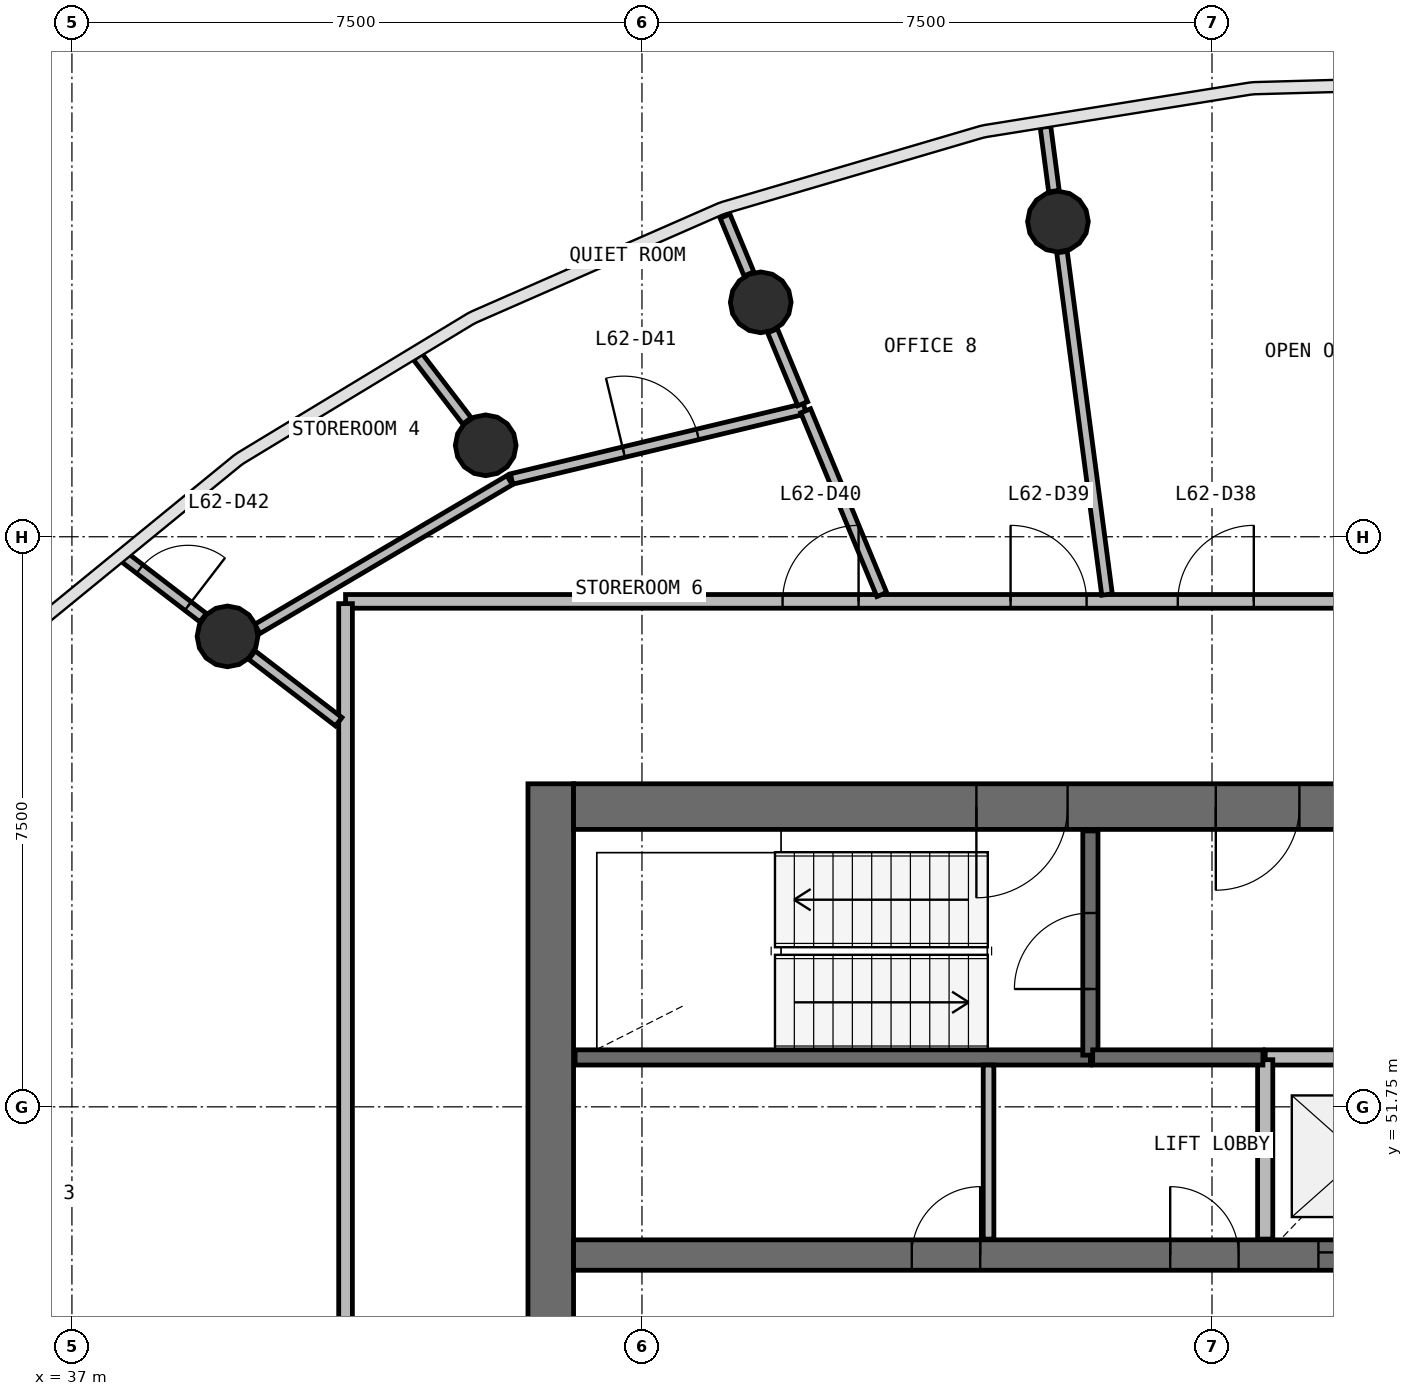
"""IFC4 building model, lengths in metres.
Left out: names, types, materials, properties, quantities, classifications, styles, units other than length and angle.
Written with IfcOpenShell. Run it as: python <this file> out.ifc"""

import sys

from ifc_helpers import new_model, si_unit, direction, frame, frame_2d, origin, origin_2d, place, context, subcontext, project, spatial, rectangle, circle, extrude, source, transform, mapped, element, fill, save


model = new_model("IFC4")
c1 = context("Model", 3, precision=1e-05, world=origin(), true_north=direction((0.0, 1.0)))
c2 = subcontext(c1, "Body", "Model", "MODEL_VIEW")
j1 = project(units=[si_unit("LENGTHUNIT", "METRE"), si_unit("PLANEANGLEUNIT", "RADIAN")], contexts=[c1])
p1 = place(None, origin())
s1 = spatial("IfcSite", under=j1, at=p1, CompositionType="ELEMENT")
p2 = place(p1, origin())
s2 = spatial("IfcBuilding", under=s1, at=p2, CompositionType="ELEMENT")
p3 = place(p2, frame((0.0, 0.0, 254.0)))
s3 = spatial("IfcBuildingStorey", under=s2, at=p3, CompositionType="ELEMENT", Elevation=254.0)
p4 = place(p3, frame((43.3, 56.0, 0.0), z_axis=(0.0, 0.0, 1.0), x_axis=(0.0, -1.0, 0.0)))
e1 = element("IfcWall", 1, at=p4, inside=s3, PredefinedType="SHEAR", context=c2, shape_type="SweptSolid", body=[
    extrude(rectangle(XDim=16.0, YDim=0.6, at=frame_2d((8.0, 0.0))), origin(), (0.0, 0.0, 1.0), 3.9),
])
p5 = place(p4, frame((7.1, 0.0, 0.0)))
e2 = element("IfcOpeningElement", 2, at=p5, cuts=e1, PredefinedType="OPENING", context=c2, shape_type="SweptSolid", body=[
    extrude(rectangle(XDim=1.8, YDim=2.1, at=frame_2d((0.9, 1.05))), frame((0.0, 0.31, 0.0), z_axis=(0.0, -1.0, 0.0), x_axis=(1.0, 0.0, 0.0)), (0.0, 0.0, 1.0), 0.62),
])
p6 = place(p3, frame((60.4, 55.7, 0.0), z_axis=(0.0, 0.0, 1.0), x_axis=(-1.0, 0.0, 0.0)))
e3 = element("IfcWall", 3, at=p6, inside=s3, PredefinedType="SHEAR", context=c2, shape_type="SweptSolid", body=[
    extrude(rectangle(XDim=16.8, YDim=0.6, at=frame_2d((8.4, 0.0))), origin(), (0.0, 0.0, 1.0), 3.9),
])
p7 = place(p6, frame((0.4, 0.0, 0.0)))
e4 = element("IfcOpeningElement", 4, at=p7, cuts=e3, PredefinedType="OPENING", context=c2, shape_type="SweptSolid", body=[
    extrude(rectangle(XDim=1.1, YDim=2.1, at=frame_2d((0.55, 1.05))), frame((0.0, 0.31, 0.0), z_axis=(0.0, -1.0, 0.0), x_axis=(1.0, 0.0, 0.0)), (0.0, 0.0, 1.0), 0.62),
])
p8 = place(p6, frame((10.3, 0.0, 0.0)))
e5 = element("IfcOpeningElement", 5, at=p8, cuts=e3, PredefinedType="OPENING", context=c2, shape_type="SweptSolid", body=[
    extrude(rectangle(XDim=1.2, YDim=2.1, at=frame_2d((0.6, 1.05))), frame((0.0, 0.31, 0.0), z_axis=(0.0, -1.0, 0.0), x_axis=(1.0, 0.0, 0.0)), (0.0, 0.0, 1.0), 0.62),
])
p9 = place(p6, frame((7.25, 0.0, 0.0)))
e6 = element("IfcOpeningElement", 6, at=p9, cuts=e3, PredefinedType="OPENING", context=c2, shape_type="SweptSolid", body=[
    extrude(rectangle(XDim=1.1, YDim=2.1, at=frame_2d((0.55, 1.05))), frame((0.0, 0.31, 0.0), z_axis=(0.0, -1.0, 0.0), x_axis=(1.0, 0.0, 0.0)), (0.0, 0.0, 1.0), 0.62),
])
p10 = place(p3, frame((43.6, 49.8, 0.0), z_axis=(0.0, 0.0, 1.0), x_axis=(1.0, 0.0, 0.0)))
e7 = element("IfcWall", 7, at=p10, inside=s3, PredefinedType="SHEAR", context=c2, shape_type="SweptSolid", body=[
    extrude(rectangle(XDim=16.8, YDim=0.4, at=frame_2d((8.4, 0.0))), origin(), (0.0, 0.0, 1.0), 3.9),
])
p11 = place(p10, frame((9.8, 0.0, 0.0)))
e8 = element("IfcOpeningElement", 8, at=p11, cuts=e7, PredefinedType="OPENING", context=c2, shape_type="SweptSolid", body=[
    extrude(rectangle(XDim=1.1, YDim=2.1, at=frame_2d((0.55, 1.05))), frame((0.0, 0.21, 0.0), z_axis=(0.0, -1.0, 0.0), x_axis=(1.0, 0.0, 0.0)), (0.0, 0.0, 1.0), 0.42),
])
p12 = place(p10, frame((12.3, 0.0, 0.0)))
e9 = element("IfcOpeningElement", 9, at=p12, cuts=e7, PredefinedType="OPENING", context=c2, shape_type="SweptSolid", body=[
    extrude(rectangle(XDim=1.1, YDim=2.1, at=frame_2d((0.55, 1.05))), frame((0.0, 0.21, 0.0), z_axis=(0.0, -1.0, 0.0), x_axis=(1.0, 0.0, 0.0)), (0.0, 0.0, 1.0), 0.42),
])
p13 = place(p10, frame((14.8, 0.0, 0.0)))
e10 = element("IfcOpeningElement", 10, at=p13, cuts=e7, PredefinedType="OPENING", context=c2, shape_type="SweptSolid", body=[
    extrude(rectangle(XDim=1.1, YDim=2.1, at=frame_2d((0.55, 1.05))), frame((0.0, 0.21, 0.0), z_axis=(0.0, -1.0, 0.0), x_axis=(1.0, 0.0, 0.0)), (0.0, 0.0, 1.0), 0.42),
])
p14 = place(p10, frame((4.45, 0.0, 0.0)))
e11 = element("IfcOpeningElement", 11, at=p14, cuts=e7, PredefinedType="OPENING", context=c2, shape_type="SweptSolid", body=[
    extrude(rectangle(XDim=0.9, YDim=2.1, at=frame_2d((0.45, 1.05))), frame((0.0, 0.21, 0.0), z_axis=(0.0, -1.0, 0.0), x_axis=(1.0, 0.0, 0.0)), (0.0, 0.0, 1.0), 0.42),
])
p15 = place(p10, frame((7.85, 0.0, 0.0)))
e12 = element("IfcOpeningElement", 12, at=p15, cuts=e7, PredefinedType="OPENING", context=c2, shape_type="SweptSolid", body=[
    extrude(rectangle(XDim=0.9, YDim=2.1, at=frame_2d((0.45, 1.05))), frame((0.0, 0.21, 0.0), z_axis=(0.0, -1.0, 0.0), x_axis=(1.0, 0.0, 0.0)), (0.0, 0.0, 1.0), 0.42),
])
m1 = source(origin(), c2, "Body", "SweptSolid", [
    extrude(circle(Radius=0.4, at=origin_2d()), origin(), (0.0, 0.0, 1.0), 3.9),
])
for number, where, z_axis, x_axis in (
    (13, (49.973, 63.396, 0.0), (0.0, 0.0, 1.0), (1.0, 0.0, 0.0)),
    (14, (46.063, 62.334, 0.0), (0.0, 0.0, 1.0), (1.0, 0.0, 0.0)),
    (15, (42.444, 60.453, 0.0), (0.0, 0.0, 1.0), (1.0, 0.0, 0.0)),
    (16, (39.047, 57.939, 0.0), (0.0, 0.0, 1.0), (1.0, 0.0, 0.0)),
):
    element("IfcColumn", number, at=place(p3, frame(where, z_axis=z_axis, x_axis=x_axis)), inside=s3, PredefinedType="COLUMN", context=c2, shape_type="MappedRepresentation", body=[
        mapped(m1, transform((0.0, 0.0, 0.0), scale=1.0)),
    ])
p16 = place(p3, frame((43.62, 52.4, 0.0), z_axis=(0.0, 0.0, 1.0), x_axis=(1.0, 0.0, 0.0)))
e17 = element("IfcWall", 17, at=p16, inside=s3, PredefinedType="SOLIDWALL", context=c2, shape_type="SweptSolid", body=[
    extrude(rectangle(XDim=6.78, YDim=0.2, at=frame_2d((3.39, 0.0))), origin(), (0.0, 0.0, 1.0), 3.58),
])
p17 = place(p3, frame((50.4, 52.43, 0.0), z_axis=(0.0, 0.0, 1.0), x_axis=(0.0, 1.0, 0.0)))
e18 = element("IfcWall", 18, at=p17, inside=s3, PredefinedType="SOLIDWALL", context=c2, shape_type="SweptSolid", body=[
    extrude(rectangle(XDim=2.95, YDim=0.2, at=frame_2d((1.475, 0.0))), origin(), (0.0, 0.0, 1.0), 3.58),
])
p18 = place(p17, frame((0.87, 0.0, 0.0)))
e19 = element("IfcOpeningElement", 19, at=p18, cuts=e18, PredefinedType="OPENING", context=c2, shape_type="SweptSolid", body=[
    extrude(rectangle(XDim=1.0, YDim=2.1, at=frame_2d((0.5, 1.05))), frame((0.0, 0.11, 0.0), z_axis=(0.0, -1.0, 0.0), x_axis=(1.0, 0.0, 0.0)), (0.0, 0.0, 1.0), 0.22),
])
p19 = place(p3, frame((55.2, 52.4, 0.0), z_axis=(0.0, 0.0, 1.0), x_axis=(-1.0, 0.0, 0.0)))
e20 = element("IfcWall", 20, at=p19, inside=s3, PredefinedType="SOLIDWALL", context=c2, shape_type="SweptSolid", body=[
    extrude(rectangle(XDim=2.5, YDim=0.2, at=frame_2d((1.25, 0.0))), origin(), (0.0, 0.0, 1.0), 3.58),
])
p20 = place(p3, frame((52.7, 52.37, 0.0), z_axis=(0.0, 0.0, 1.0), x_axis=(0.0, -1.0, 0.0)))
e21 = element("IfcWall", 21, at=p20, inside=s3, PredefinedType="SOLIDWALL", context=c2, shape_type="SweptSolid", body=[
    extrude(rectangle(XDim=2.36, YDim=0.2, at=frame_2d((1.18, 0.0))), origin(), (0.0, 0.0, 1.0), 3.58),
])
p21 = place(p3, frame((50.43, 52.4, 0.0), z_axis=(0.0, 0.0, 1.0), x_axis=(1.0, 0.0, 0.0)))
e22 = element("IfcWall", 22, at=p21, inside=s3, PredefinedType="SOLIDWALL", context=c2, shape_type="SweptSolid", body=[
    extrude(rectangle(XDim=2.24, YDim=0.2, at=frame_2d((1.12, 0.0))), origin(), (0.0, 0.0, 1.0), 3.58),
])
p22 = place(p3, frame((40.6, 58.4, 0.0), z_axis=(0.0, 0.0, 1.0), x_axis=(1.0, 0.0, 0.0)))
e23 = element("IfcWall", 23, at=p22, inside=s3, PredefinedType="PARTITIONING", context=c2, shape_type="SweptSolid", body=[
    extrude(rectangle(XDim=22.8, YDim=0.18, at=frame_2d((11.4, 0.0))), origin(), (0.0, 0.0, 1.0), 2.88),
])
p23 = place(p22, frame((16.15, 0.0, 0.0)))
e24 = element("IfcOpeningElement", 24, at=p23, cuts=e23, PredefinedType="OPENING", context=c2, shape_type="SweptSolid", body=[
    extrude(rectangle(XDim=1.0, YDim=2.1, at=frame_2d((0.5, 1.05))), frame((0.0, 0.1, 0.0), z_axis=(0.0, -1.0, 0.0), x_axis=(1.0, 0.0, 0.0)), (0.0, 0.0, 1.0), 0.2),
])
p24 = place(p22, frame((10.95, 0.0, 0.0)))
e25 = element("IfcOpeningElement", 25, at=p24, cuts=e23, PredefinedType="OPENING", context=c2, shape_type="SweptSolid", body=[
    extrude(rectangle(XDim=1.0, YDim=2.1, at=frame_2d((0.5, 1.05))), frame((0.0, 0.1, 0.0), z_axis=(0.0, -1.0, 0.0), x_axis=(1.0, 0.0, 0.0)), (0.0, 0.0, 1.0), 0.2),
])
p25 = place(p22, frame((8.75, 0.0, 0.0)))
e26 = element("IfcOpeningElement", 26, at=p25, cuts=e23, PredefinedType="OPENING", context=c2, shape_type="SweptSolid", body=[
    extrude(rectangle(XDim=1.0, YDim=2.1, at=frame_2d((0.5, 1.05))), frame((0.0, 0.1, 0.0), z_axis=(0.0, -1.0, 0.0), x_axis=(1.0, 0.0, 0.0)), (0.0, 0.0, 1.0), 0.2),
])
p26 = place(p22, frame((5.75, 0.0, 0.0)))
e27 = element("IfcOpeningElement", 27, at=p26, cuts=e23, PredefinedType="OPENING", context=c2, shape_type="SweptSolid", body=[
    extrude(rectangle(XDim=1.0, YDim=2.1, at=frame_2d((0.5, 1.05))), frame((0.0, 0.1, 0.0), z_axis=(0.0, -1.0, 0.0), x_axis=(1.0, 0.0, 0.0)), (0.0, 0.0, 1.0), 0.2),
])
p27 = place(p3, frame((40.6, 37.63, 0.0), z_axis=(0.0, 0.0, 1.0), x_axis=(0.0, 1.0, 0.0)))
e28 = element("IfcWall", 28, at=p27, inside=s3, PredefinedType="PARTITIONING", context=c2, shape_type="SweptSolid", body=[
    extrude(rectangle(XDim=20.74, YDim=0.18, at=frame_2d((10.37, 0.0))), origin(), (0.0, 0.0, 1.0), 2.88),
])
p28 = place(p27, frame((7.79, 0.0, 0.0)))
e29 = element("IfcOpeningElement", 29, at=p28, cuts=e28, PredefinedType="OPENING", context=c2, shape_type="SweptSolid", body=[
    extrude(rectangle(XDim=0.9, YDim=2.1, at=frame_2d((0.45, 1.05))), frame((0.0, 0.1, 0.0), z_axis=(0.0, -1.0, 0.0), x_axis=(1.0, 0.0, 0.0)), (0.0, 0.0, 1.0), 0.2),
])
p29 = place(p27, frame((4.39, 0.0, 0.0)))
e30 = element("IfcOpeningElement", 30, at=p29, cuts=e28, PredefinedType="OPENING", context=c2, shape_type="SweptSolid", body=[
    extrude(rectangle(XDim=0.9, YDim=2.1, at=frame_2d((0.45, 1.05))), frame((0.0, 0.1, 0.0), z_axis=(0.0, -1.0, 0.0), x_axis=(1.0, 0.0, 0.0)), (0.0, 0.0, 1.0), 0.2),
])
p30 = place(p27, frame((9.89, 0.0, 0.0)))
e31 = element("IfcOpeningElement", 31, at=p30, cuts=e28, PredefinedType="OPENING", context=c2, shape_type="SweptSolid", body=[
    extrude(rectangle(XDim=1.0, YDim=2.1, at=frame_2d((0.5, 1.05))), frame((0.0, 0.1, 0.0), z_axis=(0.0, -1.0, 0.0), x_axis=(1.0, 0.0, 0.0)), (0.0, 0.0, 1.0), 0.2),
])
p31 = place(p3, frame((50.619, 58.49, 0.0), z_axis=(0.0, 0.0, 1.0), x_axis=(-0.130505936446, 0.991447527887, 0.0)))
e32 = element("IfcWall", 32, at=p31, inside=s3, PredefinedType="PARTITIONING", context=c2, shape_type="SweptSolid", body=[
    extrude(rectangle(XDim=4.544, YDim=0.14, at=frame_2d((2.272, 0.0))), origin(), (0.0, 0.0, 1.0), 2.88),
])
p32 = place(p3, frame((42.785, 60.01, 0.0), z_axis=(0.0, 0.0, 1.0), x_axis=(0.972446486368, 0.233126212921, 0.0)))
e33 = element("IfcWall", 33, at=p32, inside=s3, PredefinedType="PARTITIONING", context=c2, shape_type="SweptSolid", body=[
    extrude(rectangle(XDim=3.967, YDim=0.14, at=frame_2d((1.983, 0.0))), origin(), (0.0, 0.0, 1.0), 2.88),
])
p33 = place(p32, frame((1.517, 0.0, 0.0)))
e34 = element("IfcOpeningElement", 34, at=p33, cuts=e33, PredefinedType="OPENING", context=c2, shape_type="SweptSolid", body=[
    extrude(rectangle(XDim=1.0, YDim=2.1, at=frame_2d((0.5, 1.05))), frame((0.0, 0.08, 0.0), z_axis=(0.0, -1.0, 0.0), x_axis=(1.0, 0.0, 0.0)), (0.0, 0.0, 1.0), 0.16),
])
p34 = place(p3, frame((42.759, 59.994, 0.0), z_axis=(0.0, 0.0, 1.0), x_axis=(-0.861469667811, -0.507809030485, 0.0)))
e35 = element("IfcWall", 35, at=p34, inside=s3, PredefinedType="PARTITIONING", context=c2, shape_type="SweptSolid", body=[
    extrude(rectangle(XDim=3.853, YDim=0.14, at=frame_2d((1.927, 0.0))), origin(), (0.0, 0.0, 1.0), 2.88),
])
p35 = place(p3, frame((47.655, 58.49, 0.0), z_axis=(0.0, 0.0, 1.0), x_axis=(-0.382659528892, 0.923889433292, 0.0)))
e36 = element("IfcWall", 36, at=p35, inside=s3, PredefinedType="PARTITIONING", context=c2, shape_type="SweptSolid", body=[
    extrude(rectangle(XDim=2.616, YDim=0.14, at=frame_2d((1.308, 0.0))), origin(), (0.0, 0.0, 1.0), 2.88),
])
p36 = place(p3, frame((49.06, 50.01, 0.0), z_axis=(0.0, 0.0, 1.0), x_axis=(0.0, 1.0, 0.0)))
e37 = element("IfcWall", 37, at=p36, inside=s3, PredefinedType="PARTITIONING", context=c2, shape_type="SweptSolid", body=[
    extrude(rectangle(XDim=2.29, YDim=0.14, at=frame_2d((1.145, 0.0))), origin(), (0.0, 0.0, 1.0), 2.88),
])
p37 = place(p3, frame((40.51, 56.817, 0.0), z_axis=(0.0, 0.0, 1.0), x_axis=(-0.793316945216, 0.608808857059, 0.0)))
e38 = element("IfcWall", 38, at=p37, inside=s3, PredefinedType="PARTITIONING", context=c2, shape_type="SweptSolid", body=[
    extrude(rectangle(XDim=1.44, YDim=0.14, at=frame_2d((0.72, 0.0))), origin(), (0.0, 0.0, 1.0), 2.88),
])
p38 = place(p3, frame((37.69, 58.98, 0.0), z_axis=(0.0, 0.0, 1.0), x_axis=(0.793401708575, -0.608698389048, 0.0)))
e39 = element("IfcWall", 39, at=p38, inside=s3, PredefinedType="PARTITIONING", context=c2, shape_type="SweptSolid", body=[
    extrude(rectangle(XDim=1.306, YDim=0.14, at=frame_2d((0.653, 0.0))), origin(), (0.0, 0.0, 1.0), 2.88),
])
p39 = place(p38, frame((0.256, 0.0, 0.0)))
e40 = element("IfcOpeningElement", 40, at=p39, cuts=e39, PredefinedType="OPENING", context=c2, shape_type="SweptSolid", body=[
    extrude(rectangle(XDim=0.8, YDim=2.1, at=frame_2d((0.4, 1.05))), frame((0.0, 0.08, 0.0), z_axis=(0.0, -1.0, 0.0), x_axis=(1.0, 0.0, 0.0)), (0.0, 0.0, 1.0), 0.16),
])
p40 = place(p3, frame((46.615, 61.0, 0.0), z_axis=(0.0, 0.0, 1.0), x_axis=(-0.38262856197, 0.923902258664, 0.0)))
e41 = element("IfcWall", 41, at=p40, inside=s3, PredefinedType="PARTITIONING", context=c2, shape_type="SweptSolid", body=[
    extrude(rectangle(XDim=1.039, YDim=0.14, at=frame_2d((0.52, 0.0))), origin(), (0.0, 0.0, 1.0), 2.88),
])
p41 = place(p3, frame((42.198, 60.774, 0.0), z_axis=(0.0, 0.0, 1.0), x_axis=(-0.608691318636, 0.793407132951, 0.0)))
e42 = element("IfcWall", 42, at=p41, inside=s3, PredefinedType="PARTITIONING", context=c2, shape_type="SweptSolid", body=[
    extrude(rectangle(XDim=1.065, YDim=0.14, at=frame_2d((0.533, 0.0))), origin(), (0.0, 0.0, 1.0), 2.88),
])
p42 = place(p3, frame((49.92, 63.797, 0.0), z_axis=(0.0, 0.0, 1.0), x_axis=(-0.130720882624, 0.991419210448, 0.0)))
e43 = element("IfcWall", 43, at=p42, inside=s3, PredefinedType="PARTITIONING", context=c2, shape_type="SweptSolid", body=[
    extrude(rectangle(XDim=0.854, YDim=0.14, at=frame_2d((0.427, 0.0))), origin(), (0.0, 0.0, 1.0), 2.88),
])
p43 = place(p3, frame((45.908, 62.708, 0.0), z_axis=(0.0, 0.0, 1.0), x_axis=(-0.382762017913, 0.923846977396, 0.0)))
e44 = element("IfcWall", 44, at=p43, inside=s3, PredefinedType="PARTITIONING", context=c2, shape_type="SweptSolid", body=[
    extrude(rectangle(XDim=0.823, YDim=0.14, at=frame_2d((0.412, 0.0))), origin(), (0.0, 0.0, 1.0), 2.88),
])
m2 = source(origin(), c2, "Body", "SweptSolid", [
    extrude(rectangle(XDim=1.1, YDim=2.1, at=frame_2d((0.55, 1.05))), frame((0.0, 0.025, 0.0), z_axis=(0.0, -1.0, 0.0), x_axis=(1.0, 0.0, 0.0)), (0.0, 0.0, 1.0), 0.05),
])
p44 = place(p11, origin())
e45 = element("IfcDoor", 45, at=p44, inside=s3, OperationType="DOUBLE_DOOR_SLIDING", PredefinedType="USERDEFINED", context=c2, shape_type="MappedRepresentation", body=[
    mapped(m2, transform((0.0, 0.0, 0.0), scale=1.0)),
])
fill(e8, e45)
m3 = source(origin(), c2, "Body", "SweptSolid", [
    extrude(rectangle(XDim=1.2, YDim=2.1, at=frame_2d((0.6, 1.05))), frame((0.0, 0.025, 0.0), z_axis=(0.0, -1.0, 0.0), x_axis=(1.0, 0.0, 0.0)), (0.0, 0.0, 1.0), 0.05),
])
p45 = place(p8, origin())
e46 = element("IfcDoor", 46, at=p45, inside=s3, OperationType="SINGLE_SWING_RIGHT", PredefinedType="DOOR", context=c2, shape_type="MappedRepresentation", body=[
    mapped(m3, transform((0.0, 0.0, 0.0), scale=1.0)),
])
fill(e5, e46)
m4 = source(origin(), c2, "Body", "SweptSolid", [
    extrude(rectangle(XDim=1.0, YDim=2.1, at=frame_2d((0.5, 1.05))), frame((0.0, 0.025, 0.0), z_axis=(0.0, -1.0, 0.0), x_axis=(1.0, 0.0, 0.0)), (0.0, 0.0, 1.0), 0.05),
])
p46 = place(p18, origin())
e47 = element("IfcDoor", 47, at=p46, inside=s3, OperationType="SINGLE_SWING_LEFT", PredefinedType="DOOR", context=c2, shape_type="MappedRepresentation", body=[
    mapped(m4, transform((0.0, 0.0, 0.0), scale=1.0)),
])
fill(e19, e47)
m5 = source(origin(), c2, "Body", "SweptSolid", [
    extrude(rectangle(XDim=1.1, YDim=2.1, at=frame_2d((0.55, 1.05))), frame((0.0, 0.025, 0.0), z_axis=(0.0, -1.0, 0.0), x_axis=(1.0, 0.0, 0.0)), (0.0, 0.0, 1.0), 0.05),
])
p47 = place(p9, origin())
e48 = element("IfcDoor", 48, at=p47, inside=s3, OperationType="SINGLE_SWING_RIGHT", PredefinedType="DOOR", context=c2, shape_type="MappedRepresentation", body=[
    mapped(m5, transform((0.0, 0.0, 0.0), scale=1.0)),
])
fill(e6, e48)
m6 = source(origin(), c2, "Body", "SweptSolid", [
    extrude(rectangle(XDim=1.0, YDim=2.1, at=frame_2d((0.5, 1.05))), frame((0.0, 0.025, 0.0), z_axis=(0.0, -1.0, 0.0), x_axis=(1.0, 0.0, 0.0)), (0.0, 0.0, 1.0), 0.05),
])
p48 = place(p24, origin())
e49 = element("IfcDoor", 49, at=p48, inside=s3, OperationType="SINGLE_SWING_RIGHT", PredefinedType="DOOR", context=c2, shape_type="MappedRepresentation", body=[
    mapped(m6, transform((0.0, 0.0, 0.0), scale=1.0)),
])
fill(e25, e49)
p49 = place(p25, origin())
e50 = element("IfcDoor", 50, at=p49, inside=s3, OperationType="SINGLE_SWING_LEFT", PredefinedType="DOOR", context=c2, shape_type="MappedRepresentation", body=[
    mapped(m6, transform((0.0, 0.0, 0.0), scale=1.0)),
])
fill(e26, e50)
p50 = place(p26, origin())
e51 = element("IfcDoor", 51, at=p50, inside=s3, OperationType="SINGLE_SWING_RIGHT", PredefinedType="DOOR", context=c2, shape_type="MappedRepresentation", body=[
    mapped(m6, transform((0.0, 0.0, 0.0), scale=1.0)),
])
fill(e27, e51)
p51 = place(p33, origin())
e52 = element("IfcDoor", 52, at=p51, inside=s3, OperationType="SINGLE_SWING_LEFT", PredefinedType="DOOR", context=c2, shape_type="MappedRepresentation", body=[
    mapped(m6, transform((0.0, 0.0, 0.0), scale=1.0)),
])
fill(e34, e52)
m7 = source(origin(), c2, "Body", "SweptSolid", [
    extrude(rectangle(XDim=0.8, YDim=2.1, at=frame_2d((0.4, 1.05))), frame((0.0, 0.025, 0.0), z_axis=(0.0, -1.0, 0.0), x_axis=(1.0, 0.0, 0.0)), (0.0, 0.0, 1.0), 0.05),
])
p52 = place(p39, origin())
e53 = element("IfcDoor", 53, at=p52, inside=s3, OperationType="SINGLE_SWING_RIGHT", PredefinedType="DOOR", context=c2, shape_type="MappedRepresentation", body=[
    mapped(m7, transform((0.0, 0.0, 0.0), scale=1.0)),
])
fill(e40, e53)
m8 = source(origin(), c2, "Body", "SweptSolid", [
    extrude(rectangle(XDim=0.9, YDim=2.1, at=frame_2d((0.45, 1.05))), frame((0.0, 0.025, 0.0), z_axis=(0.0, -1.0, 0.0), x_axis=(1.0, 0.0, 0.0)), (0.0, 0.0, 1.0), 0.05),
])
p53 = place(p14, origin())
e54 = element("IfcDoor", 54, at=p53, inside=s3, OperationType="SINGLE_SWING_RIGHT", PredefinedType="DOOR", context=c2, shape_type="MappedRepresentation", body=[
    mapped(m8, transform((0.0, 0.0, 0.0), scale=1.0)),
])
fill(e11, e54)
p54 = place(p15, origin())
e55 = element("IfcDoor", 55, at=p54, inside=s3, OperationType="SINGLE_SWING_LEFT", PredefinedType="DOOR", context=c2, shape_type="MappedRepresentation", body=[
    mapped(m8, transform((0.0, 0.0, 0.0), scale=1.0)),
])
fill(e12, e55)
save(model, sys.argv[1])
